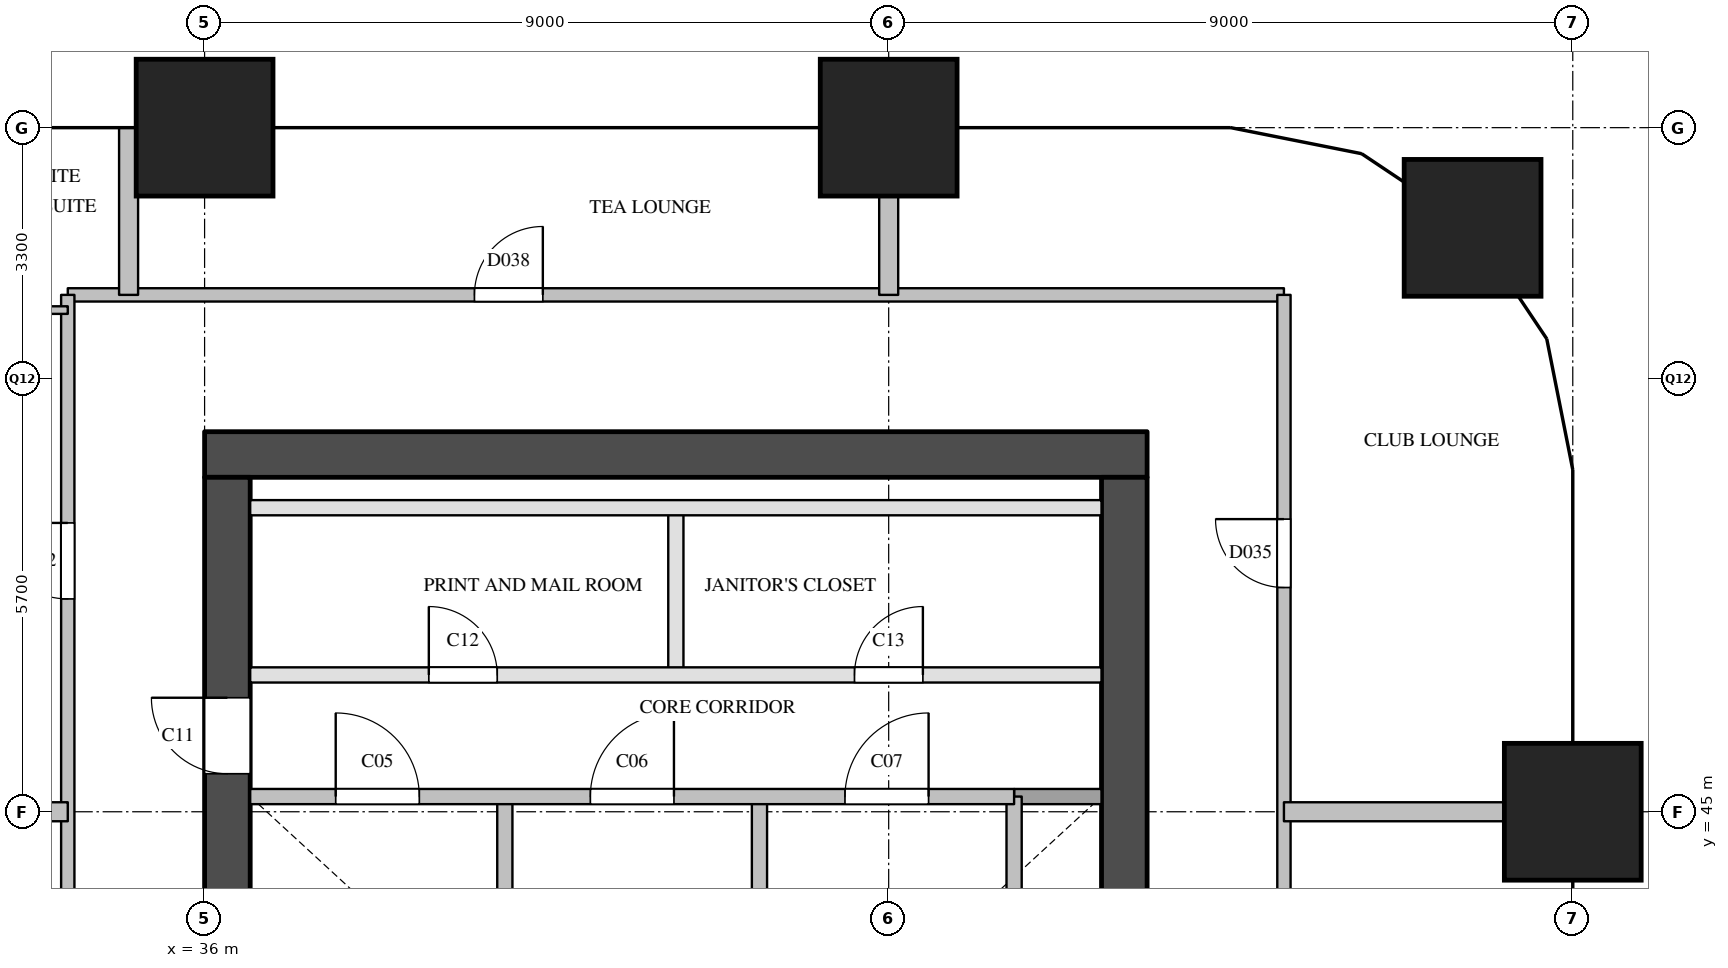
"""IFC4 building model, lengths in metres.
Left out: names, types, materials, properties, quantities, classifications, styles, units other than length and angle.
Written with IfcOpenShell. Run it as: python <this file> out.ifc"""

import sys

from ifc_helpers import new_model, si_unit, direction, frame, frame_2d, origin, origin_2d, place, context, subcontext, project, spatial, rectangle, extrude, element, fill, save


model = new_model("IFC4")
c1 = context("Model", 3, precision=1e-05, world=origin(), true_north=direction((0.0, 1.0)))
c2 = subcontext(c1, "Body", "Model", "MODEL_VIEW")
j1 = project(units=[si_unit("LENGTHUNIT", "METRE"), si_unit("PLANEANGLEUNIT", "RADIAN")], contexts=[c1])
p1 = place(None, origin())
s1 = spatial("IfcSite", under=j1, at=p1, CompositionType="ELEMENT")
p2 = place(p1, origin())
s2 = spatial("IfcBuilding", under=s1, at=p2, CompositionType="ELEMENT")
p3 = place(p2, frame((0.0, 0.0, 42.4)))
s3 = spatial("IfcBuildingStorey", under=s2, at=p3, CompositionType="ELEMENT", Elevation=42.4)
for number, where, z_axis, x_axis in (
    (1, (36.0, 54.0, 0.0), (0.0, 0.0, 1.0), (1.0, 0.0, 0.0)),
    (2, (45.0, 54.0, 0.0), (0.0, 0.0, 1.0), (1.0, 0.0, 0.0)),
    (3, (54.0, 45.0, 0.0), (0.0, 0.0, 1.0), (1.0, 0.0, 0.0)),
    (4, (52.682, 52.682, 0.0), (0.0, 0.0, 1.0), (1.0, 0.0, 0.0)),
):
    element("IfcColumn", number, at=place(p3, frame(where, z_axis=z_axis, x_axis=x_axis)), inside=s3, PredefinedType="COLUMN", context=c2, shape_type="SweptSolid", body=[
        extrude(rectangle(XDim=1.8, YDim=1.8, at=origin_2d()), origin(), (0.0, 0.0, 1.0), 3.8),
    ])
p4 = place(p3, frame((36.0, 49.7, 0.0), z_axis=(0.0, 0.0, 1.0), x_axis=(1.0, 0.0, 0.0)))
e5 = element("IfcWall", 5, at=p4, inside=s3, PredefinedType="SHEAR", context=c2, shape_type="SweptSolid", body=[
    extrude(rectangle(XDim=12.4, YDim=0.6, at=frame_2d((6.2, 0.0))), origin(), (0.0, 0.0, 1.0), 3.5),
])
p5 = place(p3, frame((36.3, 29.1, 0.0), z_axis=(0.0, 0.0, 1.0), x_axis=(0.0, 1.0, 0.0)))
e6 = element("IfcWall", 6, at=p5, inside=s3, PredefinedType="SHEAR", context=c2, shape_type="SweptSolid", body=[
    extrude(rectangle(XDim=20.3, YDim=0.6, at=frame_2d((10.15, 0.0))), origin(), (0.0, 0.0, 1.0), 3.5),
])
p6 = place(p5, frame((3.6, 0.0, 0.0)))
e7 = element("IfcOpeningElement", 7, at=p6, cuts=e6, PredefinedType="OPENING", context=c2, shape_type="SweptSolid", body=[
    extrude(rectangle(XDim=1.8, YDim=2.1, at=frame_2d((0.9, 1.05))), frame((0.0, 0.31, 0.0), z_axis=(0.0, -1.0, 0.0), x_axis=(1.0, 0.0, 0.0)), (0.0, 0.0, 1.0), 0.62),
])
p7 = place(p5, frame((16.4, 0.0, 0.0)))
e8 = element("IfcOpeningElement", 8, at=p7, cuts=e6, PredefinedType="OPENING", context=c2, shape_type="SweptSolid", body=[
    extrude(rectangle(XDim=1.0, YDim=2.1, at=frame_2d((0.5, 1.05))), frame((0.0, 0.31, 0.0), z_axis=(0.0, -1.0, 0.0), x_axis=(1.0, 0.0, 0.0)), (0.0, 0.0, 1.0), 0.62),
])
p8 = place(p3, frame((48.1, 29.1, 0.0), z_axis=(0.0, 0.0, 1.0), x_axis=(0.0, 1.0, 0.0)))
e9 = element("IfcWall", 9, at=p8, inside=s3, PredefinedType="SHEAR", context=c2, shape_type="SweptSolid", body=[
    extrude(rectangle(XDim=20.3, YDim=0.6, at=frame_2d((10.15, 0.0))), origin(), (0.0, 0.0, 1.0), 3.5),
])
p9 = place(p8, frame((12.5, 0.0, 0.0)))
e10 = element("IfcOpeningElement", 10, at=p9, cuts=e9, PredefinedType="OPENING", context=c2, shape_type="SweptSolid", body=[
    extrude(rectangle(XDim=0.7, YDim=2.1, at=frame_2d((0.35, 1.05))), frame((0.0, 0.31, 0.0), z_axis=(0.0, -1.0, 0.0), x_axis=(1.0, 0.0, 0.0)), (0.0, 0.0, 1.0), 0.62),
])
p10 = place(p8, frame((3.9, 0.0, 0.0)))
e11 = element("IfcOpeningElement", 11, at=p10, cuts=e9, PredefinedType="OPENING", context=c2, shape_type="SweptSolid", body=[
    extrude(rectangle(XDim=1.8, YDim=2.1, at=frame_2d((0.9, 1.05))), frame((0.0, 0.31, 0.0), z_axis=(0.0, -1.0, 0.0), x_axis=(1.0, 0.0, 0.0)), (0.0, 0.0, 1.0), 0.62),
])
p11 = place(p3, frame((39.95, 40.78, 0.0), z_axis=(0.0, 0.0, 1.0), x_axis=(0.0, 1.0, 0.0)))
e12 = element("IfcWall", 12, at=p11, inside=s3, PredefinedType="SOLIDWALL", context=c2, shape_type="SweptSolid", body=[
    extrude(rectangle(XDim=4.42, YDim=0.2, at=frame_2d((2.21, 0.0))), origin(), (0.0, 0.0, 1.0), 3.5),
])
p12 = place(p3, frame((42.2, 46.8, 0.0), z_axis=(0.0, 0.0, 1.0), x_axis=(0.0, 1.0, 0.0)))
e13 = element("IfcWall", 13, at=p12, inside=s3, PredefinedType="PARTITIONING", context=c2, shape_type="SweptSolid", body=[
    extrude(rectangle(XDim=2.2, YDim=0.2, at=frame_2d((1.1, 0.0))), origin(), (0.0, 0.0, 1.0), 3.5),
])
for number, where, z_axis, x_axis in (
    (14, (43.3, 40.78, 0.0), (0.0, 0.0, 1.0), (0.0, 1.0, 0.0)),
    (15, (46.65, 40.78, 0.0), (0.0, 0.0, 1.0), (0.0, 1.0, 0.0)),
):
    element("IfcWall", number, at=place(p3, frame(where, z_axis=z_axis, x_axis=x_axis)), inside=s3, PredefinedType="SOLIDWALL", context=c2, shape_type="SweptSolid", body=[
        extrude(rectangle(XDim=4.42, YDim=0.2, at=frame_2d((2.21, 0.0))), origin(), (0.0, 0.0, 1.0), 3.5),
    ])
p13 = place(p3, frame((46.65, 45.2, 0.0), z_axis=(0.0, 0.0, 1.0), x_axis=(1.0, 0.0, 0.0)))
e16 = element("IfcWall", 16, at=p13, inside=s3, PredefinedType="SOLIDWALL", context=c2, shape_type="SweptSolid", body=[
    extrude(rectangle(XDim=1.15, YDim=0.2, at=frame_2d((0.575, 0.0))), origin(), (0.0, 0.0, 1.0), 3.5),
])
p14 = place(p3, frame((36.6, 45.2, 0.0), z_axis=(0.0, 0.0, 1.0), x_axis=(1.0, 0.0, 0.0)))
e17 = element("IfcWall", 17, at=p14, inside=s3, PredefinedType="SOLIDWALL", context=c2, shape_type="SweptSolid", body=[
    extrude(rectangle(XDim=10.05, YDim=0.2, at=frame_2d((5.025, 0.0))), origin(), (0.0, 0.0, 1.0), 3.5),
])
p15 = place(p14, frame((1.125, 0.0, 0.0)))
e18 = element("IfcOpeningElement", 18, at=p15, cuts=e17, PredefinedType="OPENING", context=c2, shape_type="SweptSolid", body=[
    extrude(rectangle(XDim=1.1, YDim=2.1, at=frame_2d((0.55, 1.05))), frame((0.0, 0.11, 0.0), z_axis=(0.0, -1.0, 0.0), x_axis=(1.0, 0.0, 0.0)), (0.0, 0.0, 1.0), 0.22),
])
p16 = place(p14, frame((4.475, 0.0, 0.0)))
e19 = element("IfcOpeningElement", 19, at=p16, cuts=e17, PredefinedType="OPENING", context=c2, shape_type="SweptSolid", body=[
    extrude(rectangle(XDim=1.1, YDim=2.1, at=frame_2d((0.55, 1.05))), frame((0.0, 0.11, 0.0), z_axis=(0.0, -1.0, 0.0), x_axis=(1.0, 0.0, 0.0)), (0.0, 0.0, 1.0), 0.22),
])
p17 = place(p14, frame((7.825, 0.0, 0.0)))
e20 = element("IfcOpeningElement", 20, at=p17, cuts=e17, PredefinedType="OPENING", context=c2, shape_type="SweptSolid", body=[
    extrude(rectangle(XDim=1.1, YDim=2.1, at=frame_2d((0.55, 1.05))), frame((0.0, 0.11, 0.0), z_axis=(0.0, -1.0, 0.0), x_axis=(1.0, 0.0, 0.0)), (0.0, 0.0, 1.0), 0.22),
])
p18 = place(p3, frame((36.6, 46.8, 0.0), z_axis=(0.0, 0.0, 1.0), x_axis=(1.0, 0.0, 0.0)))
e21 = element("IfcWall", 21, at=p18, inside=s3, PredefinedType="PARTITIONING", context=c2, shape_type="SweptSolid", body=[
    extrude(rectangle(XDim=11.2, YDim=0.2, at=frame_2d((5.6, 0.0))), origin(), (0.0, 0.0, 1.0), 3.5),
])
p19 = place(p18, frame((2.35, 0.0, 0.0)))
e22 = element("IfcOpeningElement", 22, at=p19, cuts=e21, PredefinedType="OPENING", context=c2, shape_type="SweptSolid", body=[
    extrude(rectangle(XDim=0.9, YDim=2.1, at=frame_2d((0.45, 1.05))), frame((0.0, 0.11, 0.0), z_axis=(0.0, -1.0, 0.0), x_axis=(1.0, 0.0, 0.0)), (0.0, 0.0, 1.0), 0.22),
])
p20 = place(p18, frame((7.95, 0.0, 0.0)))
e23 = element("IfcOpeningElement", 23, at=p20, cuts=e21, PredefinedType="OPENING", context=c2, shape_type="SweptSolid", body=[
    extrude(rectangle(XDim=0.9, YDim=2.1, at=frame_2d((0.45, 1.05))), frame((0.0, 0.11, 0.0), z_axis=(0.0, -1.0, 0.0), x_axis=(1.0, 0.0, 0.0)), (0.0, 0.0, 1.0), 0.22),
])
p21 = place(p3, frame((36.6, 49.0, 0.0), z_axis=(0.0, 0.0, 1.0), x_axis=(1.0, 0.0, 0.0)))
e24 = element("IfcWall", 24, at=p21, inside=s3, PredefinedType="PARTITIONING", context=c2, shape_type="SweptSolid", body=[
    extrude(rectangle(XDim=11.2, YDim=0.2, at=frame_2d((5.6, 0.0))), origin(), (0.0, 0.0, 1.0), 3.5),
])
p22 = place(p3, frame((34.2, 51.8, 0.0), z_axis=(0.0, 0.0, 1.0), x_axis=(1.0, 0.0, 0.0)))
e25 = element("IfcWall", 25, at=p22, inside=s3, PredefinedType="PARTITIONING", context=c2, shape_type="SweptSolid", body=[
    extrude(rectangle(XDim=16.0, YDim=0.175, at=frame_2d((8.0, 0.0))), origin(), (0.0, 0.0, 1.0), 3.5),
])
p23 = place(p22, frame((5.35, 0.0, 0.0)))
e26 = element("IfcOpeningElement", 26, at=p23, cuts=e25, PredefinedType="OPENING", context=c2, shape_type="SweptSolid", body=[
    extrude(rectangle(XDim=0.9, YDim=2.1, at=frame_2d((0.45, 1.05))), frame((0.0, 0.097, 0.0), z_axis=(0.0, -1.0, 0.0), x_axis=(1.0, 0.0, 0.0)), (0.0, 0.0, 1.0), 0.195),
])
p24 = place(p3, frame((34.2, 29.12, 0.0), z_axis=(0.0, 0.0, 1.0), x_axis=(0.0, 1.0, 0.0)))
e27 = element("IfcWall", 27, at=p24, inside=s3, PredefinedType="PARTITIONING", context=c2, shape_type="SweptSolid", body=[
    extrude(rectangle(XDim=22.68, YDim=0.175, at=frame_2d((11.34, 0.0))), origin(), (0.0, 0.0, 1.0), 3.5),
])
p25 = place(p24, frame((2.44, 0.0, 0.0)))
e28 = element("IfcOpeningElement", 28, at=p25, cuts=e27, PredefinedType="OPENING", context=c2, shape_type="SweptSolid", body=[
    extrude(rectangle(XDim=1.0, YDim=2.1, at=frame_2d((0.5, 1.05))), frame((0.0, 0.097, 0.0), z_axis=(0.0, -1.0, 0.0), x_axis=(1.0, 0.0, 0.0)), (0.0, 0.0, 1.0), 0.195),
])
p26 = place(p24, frame((10.43, 0.0, 0.0)))
e29 = element("IfcOpeningElement", 29, at=p26, cuts=e27, PredefinedType="OPENING", context=c2, shape_type="SweptSolid", body=[
    extrude(rectangle(XDim=0.9, YDim=2.1, at=frame_2d((0.45, 1.05))), frame((0.0, 0.097, 0.0), z_axis=(0.0, -1.0, 0.0), x_axis=(1.0, 0.0, 0.0)), (0.0, 0.0, 1.0), 0.195),
])
p27 = place(p24, frame((18.68, 0.0, 0.0)))
e30 = element("IfcOpeningElement", 30, at=p27, cuts=e27, PredefinedType="OPENING", context=c2, shape_type="SweptSolid", body=[
    extrude(rectangle(XDim=1.0, YDim=2.1, at=frame_2d((0.5, 1.05))), frame((0.0, 0.097, 0.0), z_axis=(0.0, -1.0, 0.0), x_axis=(1.0, 0.0, 0.0)), (0.0, 0.0, 1.0), 0.195),
])
p28 = place(p3, frame((50.2, 26.7, 0.0), z_axis=(0.0, 0.0, 1.0), x_axis=(0.0, 1.0, 0.0)))
e31 = element("IfcWall", 31, at=p28, inside=s3, PredefinedType="PARTITIONING", context=c2, shape_type="SweptSolid", body=[
    extrude(rectangle(XDim=25.1, YDim=0.175, at=frame_2d((12.55, 0.0))), origin(), (0.0, 0.0, 1.0), 2.5),
])
p29 = place(p28, frame((1.15, 0.0, 0.0)))
e32 = element("IfcOpeningElement", 32, at=p29, cuts=e31, PredefinedType="OPENING", context=c2, shape_type="SweptSolid", body=[
    extrude(rectangle(XDim=1.0, YDim=2.1, at=frame_2d((0.5, 1.05))), frame((0.0, 0.097, 0.0), z_axis=(0.0, -1.0, 0.0), x_axis=(1.0, 0.0, 0.0)), (0.0, 0.0, 1.0), 0.195),
])
p30 = place(p28, frame((7.85, 0.0, 0.0)))
e33 = element("IfcOpeningElement", 33, at=p30, cuts=e31, PredefinedType="OPENING", context=c2, shape_type="SweptSolid", body=[
    extrude(rectangle(XDim=0.9, YDim=2.1, at=frame_2d((0.45, 1.05))), frame((0.0, 0.097, 0.0), z_axis=(0.0, -1.0, 0.0), x_axis=(1.0, 0.0, 0.0)), (0.0, 0.0, 1.0), 0.195),
])
p31 = place(p28, frame((15.35, 0.0, 0.0)))
e34 = element("IfcOpeningElement", 34, at=p31, cuts=e31, PredefinedType="OPENING", context=c2, shape_type="SweptSolid", body=[
    extrude(rectangle(XDim=0.9, YDim=2.1, at=frame_2d((0.45, 1.05))), frame((0.0, 0.097, 0.0), z_axis=(0.0, -1.0, 0.0), x_axis=(1.0, 0.0, 0.0)), (0.0, 0.0, 1.0), 0.195),
])
p32 = place(p28, frame((21.25, 0.0, 0.0)))
e35 = element("IfcOpeningElement", 35, at=p32, cuts=e31, PredefinedType="OPENING", context=c2, shape_type="SweptSolid", body=[
    extrude(rectangle(XDim=0.9, YDim=2.1, at=frame_2d((0.45, 1.05))), frame((0.0, 0.097, 0.0), z_axis=(0.0, -1.0, 0.0), x_axis=(1.0, 0.0, 0.0)), (0.0, 0.0, 1.0), 0.195),
])
p33 = place(p3, frame((19.8, 45.0, 0.0), z_axis=(0.0, 0.0, 1.0), x_axis=(1.0, 0.0, 0.0)))
e36 = element("IfcWall", 36, at=p33, inside=s3, PredefinedType="PARTITIONING", context=c2, shape_type="SweptSolid", body=[
    extrude(rectangle(XDim=14.4, YDim=0.25, at=frame_2d((7.2, 0.0))), origin(), (0.0, 0.0, 1.0), 3.5),
])
p34 = place(p3, frame((50.2, 45.0, 0.0), z_axis=(0.0, 0.0, 1.0), x_axis=(1.0, 0.0, 0.0)))
e37 = element("IfcWall", 37, at=p34, inside=s3, PredefinedType="PARTITIONING", context=c2, shape_type="SweptSolid", body=[
    extrude(rectangle(XDim=3.8, YDim=0.25, at=frame_2d((1.9, 0.0))), origin(), (0.0, 0.0, 1.0), 3.5),
])
p35 = place(p3, frame((35.0, 51.8, 0.0), z_axis=(0.0, 0.0, 1.0), x_axis=(0.0, 1.0, 0.0)))
e38 = element("IfcWall", 38, at=p35, inside=s3, PredefinedType="PARTITIONING", context=c2, shape_type="SweptSolid", body=[
    extrude(rectangle(XDim=2.2, YDim=0.25, at=frame_2d((1.1, 0.0))), origin(), (0.0, 0.0, 1.0), 2.5),
])
p36 = place(p3, frame((45.0, 51.8, 0.0), z_axis=(0.0, 0.0, 1.0), x_axis=(0.0, 1.0, 0.0)))
e39 = element("IfcWall", 39, at=p36, inside=s3, PredefinedType="PARTITIONING", context=c2, shape_type="SweptSolid", body=[
    extrude(rectangle(XDim=2.2, YDim=0.25, at=frame_2d((1.1, 0.0))), origin(), (0.0, 0.0, 1.0), 3.5),
])
p37 = place(p3, frame((32.6, 51.6, 0.0), z_axis=(0.0, 0.0, 1.0), x_axis=(1.0, 0.0, 0.0)))
e40 = element("IfcWall", 40, at=p37, inside=s3, PredefinedType="PARTITIONING", context=c2, shape_type="SweptSolid", body=[
    extrude(rectangle(XDim=1.6, YDim=0.1, at=frame_2d((0.8, 0.0))), origin(), (0.0, 0.0, 1.0), 3.5),
])
p38 = place(p15, origin())
e41 = element("IfcDoor", 41, at=p38, inside=s3, OperationType="SINGLE_SWING_LEFT", PredefinedType="DOOR", context=c2, shape_type="SweptSolid", body=[
    extrude(rectangle(XDim=1.1, YDim=2.1, at=frame_2d((0.55, 1.05))), frame((0.0, 0.025, 0.0), z_axis=(0.0, -1.0, 0.0), x_axis=(1.0, 0.0, 0.0)), (0.0, 0.0, 1.0), 0.05),
])
fill(e18, e41)
p39 = place(p16, origin())
e42 = element("IfcDoor", 42, at=p39, inside=s3, OperationType="SINGLE_SWING_RIGHT", PredefinedType="DOOR", context=c2, shape_type="SweptSolid", body=[
    extrude(rectangle(XDim=1.1, YDim=2.1, at=frame_2d((0.55, 1.05))), frame((0.0, 0.025, 0.0), z_axis=(0.0, -1.0, 0.0), x_axis=(1.0, 0.0, 0.0)), (0.0, 0.0, 1.0), 0.05),
])
fill(e19, e42)
p40 = place(p17, origin())
e43 = element("IfcDoor", 43, at=p40, inside=s3, OperationType="SINGLE_SWING_RIGHT", PredefinedType="DOOR", context=c2, shape_type="SweptSolid", body=[
    extrude(rectangle(XDim=1.1, YDim=2.1, at=frame_2d((0.55, 1.05))), frame((0.0, 0.025, 0.0), z_axis=(0.0, -1.0, 0.0), x_axis=(1.0, 0.0, 0.0)), (0.0, 0.0, 1.0), 0.05),
])
fill(e20, e43)
p41 = place(p7, origin())
e44 = element("IfcDoor", 44, at=p41, inside=s3, OperationType="SINGLE_SWING_RIGHT", PredefinedType="DOOR", context=c2, shape_type="SweptSolid", body=[
    extrude(rectangle(XDim=1.0, YDim=2.1, at=frame_2d((0.5, 1.05))), frame((0.0, 0.025, 0.0), z_axis=(0.0, -1.0, 0.0), x_axis=(1.0, 0.0, 0.0)), (0.0, 0.0, 1.0), 0.05),
])
fill(e8, e44)
p42 = place(p19, origin())
e45 = element("IfcDoor", 45, at=p42, inside=s3, OperationType="SINGLE_SWING_LEFT", PredefinedType="DOOR", context=c2, shape_type="SweptSolid", body=[
    extrude(rectangle(XDim=0.9, YDim=2.1, at=frame_2d((0.45, 1.05))), frame((0.0, 0.025, 0.0), z_axis=(0.0, -1.0, 0.0), x_axis=(1.0, 0.0, 0.0)), (0.0, 0.0, 1.0), 0.05),
])
fill(e22, e45)
p43 = place(p20, origin())
e46 = element("IfcDoor", 46, at=p43, inside=s3, OperationType="SINGLE_SWING_RIGHT", PredefinedType="DOOR", context=c2, shape_type="SweptSolid", body=[
    extrude(rectangle(XDim=0.9, YDim=2.1, at=frame_2d((0.45, 1.05))), frame((0.0, 0.025, 0.0), z_axis=(0.0, -1.0, 0.0), x_axis=(1.0, 0.0, 0.0)), (0.0, 0.0, 1.0), 0.05),
])
fill(e23, e46)
p44 = place(p27, origin())
e47 = element("IfcDoor", 47, at=p44, inside=s3, OperationType="SINGLE_SWING_RIGHT", PredefinedType="DOOR", context=c2, shape_type="SweptSolid", body=[
    extrude(rectangle(XDim=1.0, YDim=2.1, at=frame_2d((0.5, 1.05))), frame((0.0, 0.025, 0.0), z_axis=(0.0, -1.0, 0.0), x_axis=(1.0, 0.0, 0.0)), (0.0, 0.0, 1.0), 0.05),
])
fill(e30, e47)
p45 = place(p32, origin())
e48 = element("IfcDoor", 48, at=p45, inside=s3, OperationType="SINGLE_SWING_RIGHT", PredefinedType="DOOR", context=c2, shape_type="SweptSolid", body=[
    extrude(rectangle(XDim=0.9, YDim=2.1, at=frame_2d((0.45, 1.05))), frame((0.0, 0.025, 0.0), z_axis=(0.0, -1.0, 0.0), x_axis=(1.0, 0.0, 0.0)), (0.0, 0.0, 1.0), 0.05),
])
fill(e35, e48)
p46 = place(p23, origin())
e49 = element("IfcDoor", 49, at=p46, inside=s3, OperationType="SINGLE_SWING_RIGHT", PredefinedType="DOOR", context=c2, shape_type="SweptSolid", body=[
    extrude(rectangle(XDim=0.9, YDim=2.1, at=frame_2d((0.45, 1.05))), frame((0.0, 0.025, 0.0), z_axis=(0.0, -1.0, 0.0), x_axis=(1.0, 0.0, 0.0)), (0.0, 0.0, 1.0), 0.05),
])
fill(e26, e49)
save(model, sys.argv[1])
